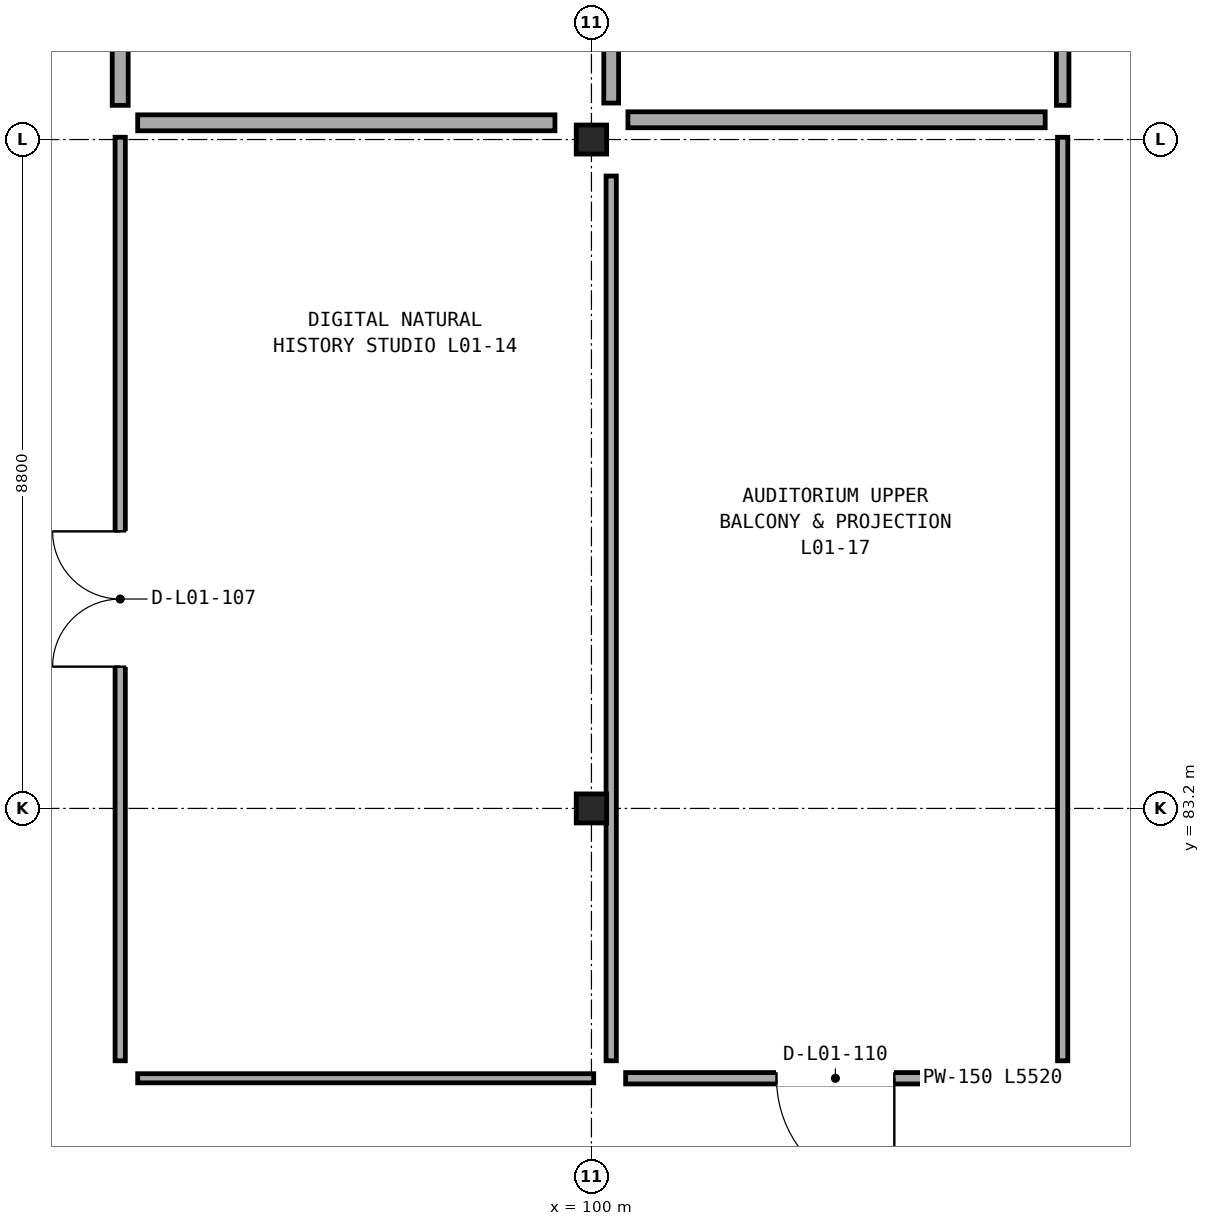
"""IFC4 building model, lengths in metres.
Left out: names, types, materials, properties, quantities, classifications, styles, units other than length and angle.
Written with IfcOpenShell. Run it as: python <this file> out.ifc"""

import sys

from ifc_helpers import new_model, si_unit, direction, frame, frame_2d, origin, origin_2d, place, context, subcontext, project, spatial, rectangle, i_section, extrude, element, fill, save


model = new_model("IFC4")
c1 = context("Model", 3, precision=1e-05, world=origin(), true_north=direction((0.0, 1.0)))
c2 = subcontext(c1, "Body", "Model", "MODEL_VIEW")
j1 = project(units=[si_unit("LENGTHUNIT", "METRE"), si_unit("PLANEANGLEUNIT", "RADIAN")], contexts=[c1])
p1 = place(None, origin())
s1 = spatial("IfcSite", under=j1, at=p1, CompositionType="ELEMENT")
p2 = place(p1, origin())
s2 = spatial("IfcBuilding", under=s1, at=p2, CompositionType="ELEMENT")
p3 = place(p2, frame((0.0, 0.0, 5.6)))
s3 = spatial("IfcBuildingStorey", under=s2, at=p3, CompositionType="ELEMENT", Elevation=5.6)
for number, where, z_axis, x_axis in (
    (1, (100.0, 83.2, 0.0), (0.0, 0.0, 1.0), (1.0, 0.0, 0.0)),
    (2, (100.0, 92.0, 0.0), (0.0, 0.0, 1.0), (1.0, 0.0, 0.0)),
):
    element("IfcColumn", number, at=place(p3, frame(where, z_axis=z_axis, x_axis=x_axis)), inside=s3, PredefinedType="COLUMN", context=c2, shape_type="SweptSolid", body=[
        extrude(i_section(OverallWidth=0.4, OverallDepth=0.382, WebThickness=0.025, FlangeThickness=0.036, at=origin_2d()), origin(), (0.0, 0.0, 1.0), 4.5),
    ])
p4 = place(p3, frame((93.8, 92.45, 0.0), z_axis=(0.0, 0.0, 1.0), x_axis=(0.0, 1.0, 0.0)))
e3 = element("IfcWall", 3, at=p4, inside=s3, PredefinedType="PARTITIONING", context=c2, shape_type="SweptSolid", body=[
    extrude(rectangle(XDim=15.19, YDim=0.21, at=frame_2d((7.595, 0.0))), origin(), (0.0, 0.0, 1.0), 3.613),
])
p5 = place(p4, frame((7.07, 0.0, 0.0)))
e4 = element("IfcOpeningElement", 4, at=p5, cuts=e3, PredefinedType="OPENING", context=c2, shape_type="SweptSolid", body=[
    extrude(rectangle(XDim=1.05, YDim=2.15, at=frame_2d((0.525, 1.075))), frame((0.0, 0.115, 0.0), z_axis=(0.0, -1.0, 0.0), x_axis=(1.0, 0.0, 0.0)), (0.0, 0.0, 1.0), 0.23),
])
p6 = place(p3, frame((93.8, 79.88, 0.0), z_axis=(0.0, 0.0, 1.0), x_axis=(0.0, 1.0, 0.0)))
e5 = element("IfcWall", 5, at=p6, inside=s3, PredefinedType="PARTITIONING", context=c2, shape_type="SweptSolid", body=[
    extrude(rectangle(XDim=12.15, YDim=0.135, at=frame_2d((6.075, 0.0))), origin(), (0.0, 0.0, 1.0), 3.613),
])
p7 = place(p6, frame((5.185, 0.0, 0.0)))
e6 = element("IfcOpeningElement", 6, at=p7, cuts=e5, PredefinedType="OPENING", context=c2, shape_type="SweptSolid", body=[
    extrude(rectangle(XDim=1.78, YDim=2.46, at=frame_2d((0.89, 1.23))), frame((0.0, 0.078, 0.0), z_axis=(0.0, -1.0, 0.0), x_axis=(1.0, 0.0, 0.0)), (0.0, 0.0, 1.0), 0.155),
])
p8 = place(p3, frame((100.03, 79.65, 0.0), z_axis=(0.0, 0.0, 1.0), x_axis=(-1.0, 0.0, 0.0)))
e7 = element("IfcWall", 7, at=p8, inside=s3, PredefinedType="PARTITIONING", context=c2, shape_type="SweptSolid", body=[
    extrude(rectangle(XDim=6.0, YDim=0.12, at=frame_2d((3.0, 0.0))), origin(), (0.0, 0.0, 1.0), 4.13),
])
p9 = place(p3, frame((105.97, 79.65, 0.0), z_axis=(0.0, 0.0, 1.0), x_axis=(-1.0, 0.0, 0.0)))
e8 = element("IfcWall", 8, at=p9, inside=s3, PredefinedType="PARTITIONING", context=c2, shape_type="SweptSolid", body=[
    extrude(rectangle(XDim=5.52, YDim=0.15, at=frame_2d((2.76, 0.0))), origin(), (0.0, 0.0, 1.0), 4.13),
])
p10 = place(p9, frame((1.985, 0.0, 0.0)))
e9 = element("IfcOpeningElement", 9, at=p10, cuts=e8, PredefinedType="OPENING", context=c2, shape_type="SweptSolid", body=[
    extrude(rectangle(XDim=1.55, YDim=2.58, at=frame_2d((0.775, 1.29))), frame((0.0, 0.085, 0.0), z_axis=(0.0, -1.0, 0.0), x_axis=(1.0, 0.0, 0.0)), (0.0, 0.0, 1.0), 0.17),
])
p11 = place(p3, frame((106.2, 92.03, 0.0), z_axis=(0.0, 0.0, 1.0), x_axis=(0.0, -1.0, 0.0)))
e10 = element("IfcWall", 10, at=p11, inside=s3, PredefinedType="PARTITIONING", context=c2, shape_type="SweptSolid", body=[
    extrude(rectangle(XDim=12.15, YDim=0.135, at=frame_2d((6.075, 0.0))), origin(), (0.0, 0.0, 1.0), 3.613),
])
p12 = place(p3, frame((106.2, 107.64, 0.0), z_axis=(0.0, 0.0, 1.0), x_axis=(0.0, -1.0, 0.0)))
e11 = element("IfcWall", 11, at=p12, inside=s3, PredefinedType="PARTITIONING", context=c2, shape_type="SweptSolid", body=[
    extrude(rectangle(XDim=15.19, YDim=0.165, at=frame_2d((7.595, 0.0))), origin(), (0.0, 0.0, 1.0), 3.613),
])
p13 = place(p3, frame((99.52, 92.22, 0.0), z_axis=(0.0, 0.0, 1.0), x_axis=(-1.0, 0.0, 0.0)))
e12 = element("IfcWall", 12, at=p13, inside=s3, PredefinedType="PARTITIONING", context=c2, shape_type="SweptSolid", body=[
    extrude(rectangle(XDim=5.49, YDim=0.21, at=frame_2d((2.745, 0.0))), origin(), (0.0, 0.0, 1.0), 3.613),
])
p14 = place(p3, frame((100.26, 107.9, 0.0), z_axis=(0.0, 0.0, 1.0), x_axis=(0.0, -1.0, 0.0)))
e13 = element("IfcWall", 13, at=p14, inside=s3, PredefinedType="PARTITIONING", context=c2, shape_type="SweptSolid", body=[
    extrude(rectangle(XDim=15.42, YDim=0.195, at=frame_2d((7.71, 0.0))), origin(), (0.0, 0.0, 1.0), 3.613),
])
p15 = place(p3, frame((100.26, 91.52, 0.0), z_axis=(0.0, 0.0, 1.0), x_axis=(0.0, -1.0, 0.0)))
e14 = element("IfcWall", 14, at=p15, inside=s3, PredefinedType="PARTITIONING", context=c2, shape_type="SweptSolid", body=[
    extrude(rectangle(XDim=11.64, YDim=0.135, at=frame_2d((5.82, 0.0))), origin(), (0.0, 0.0, 1.0), 3.613),
])
p16 = place(p3, frame((100.48, 92.26, 0.0), z_axis=(0.0, 0.0, 1.0), x_axis=(1.0, 0.0, 0.0)))
e15 = element("IfcWall", 15, at=p16, inside=s3, PredefinedType="PARTITIONING", context=c2, shape_type="SweptSolid", body=[
    extrude(rectangle(XDim=5.49, YDim=0.21, at=frame_2d((2.745, 0.0))), origin(), (0.0, 0.0, 1.0), 3.613),
])
p17 = place(p7, origin())
e16 = element("IfcDoor", 16, at=p17, inside=s3, OperationType="DOUBLE_DOOR_SINGLE_SWING", PredefinedType="DOOR", context=c2, shape_type="SweptSolid", body=[
    extrude(rectangle(XDim=1.78, YDim=2.46, at=frame_2d((0.89, 1.23))), frame((0.0, 0.025, 0.0), z_axis=(0.0, -1.0, 0.0), x_axis=(1.0, 0.0, 0.0)), (0.0, 0.0, 1.0), 0.05),
])
fill(e6, e16)
p18 = place(p10, origin())
e17 = element("IfcDoor", 17, at=p18, inside=s3, OperationType="SINGLE_SWING_LEFT", PredefinedType="DOOR", context=c2, shape_type="SweptSolid", body=[
    extrude(rectangle(XDim=1.55, YDim=2.58, at=frame_2d((0.775, 1.29))), frame((0.0, 0.025, 0.0), z_axis=(0.0, -1.0, 0.0), x_axis=(1.0, 0.0, 0.0)), (0.0, 0.0, 1.0), 0.05),
])
fill(e9, e17)
save(model, sys.argv[1])
